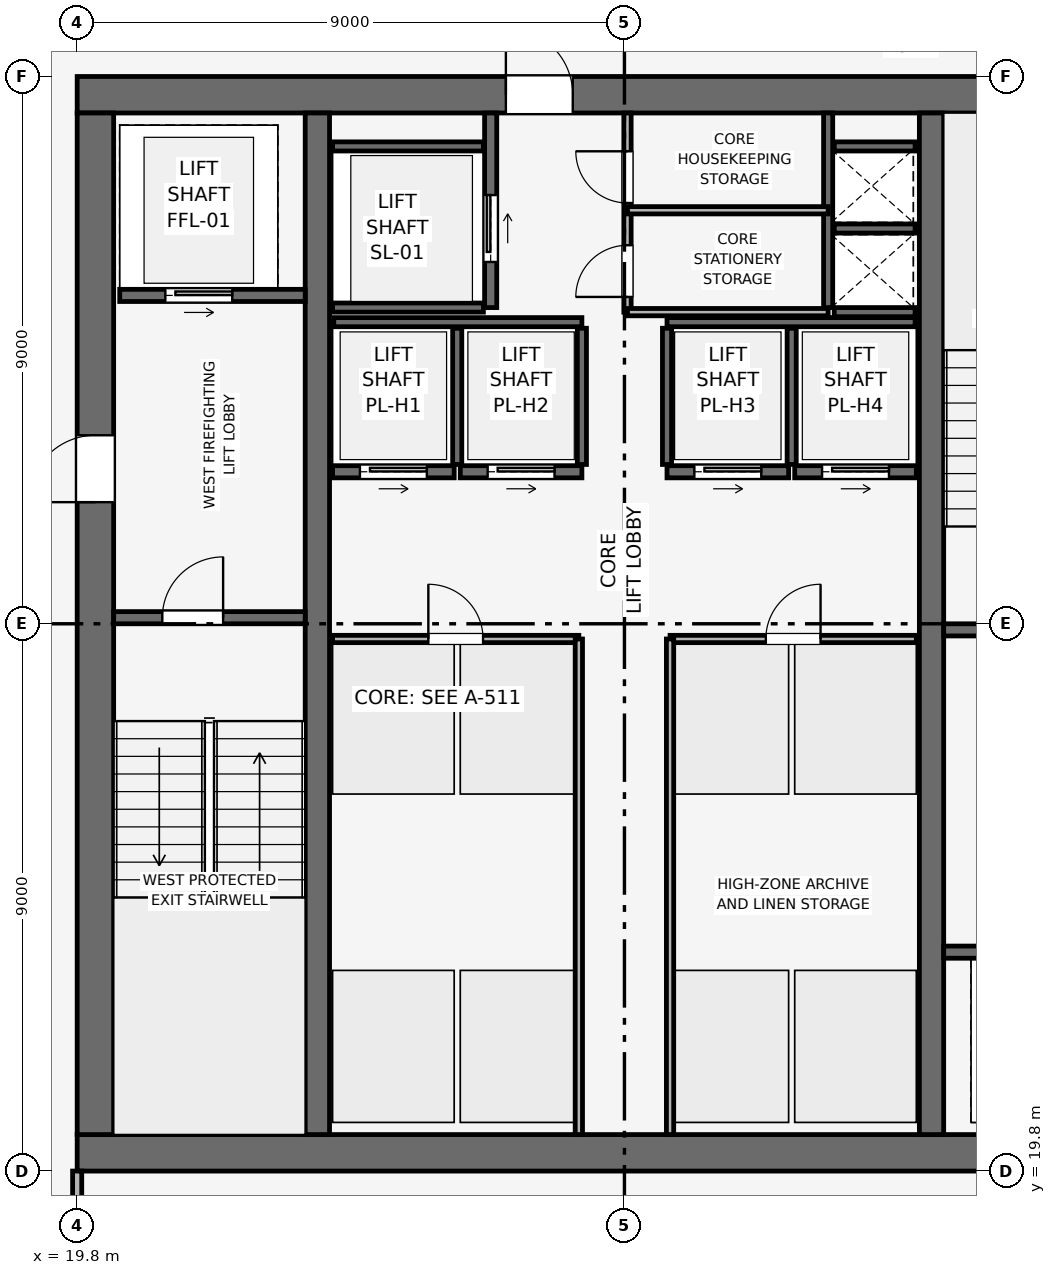
"""IFC4 building model, lengths in metres.
Left out: names, types, materials, properties, quantities, classifications, styles, units other than length and angle.
Written with IfcOpenShell. Run it as: python <this file> out.ifc"""

import sys

from ifc_helpers import new_model, si_unit, direction, frame, frame_2d, origin, place, context, subcontext, project, spatial, rectangle, extrude, element, fill, save


model = new_model("IFC4")
c1 = context("Model", 3, precision=1e-05, world=origin(), true_north=direction((0.0, 1.0)))
c2 = subcontext(c1, "Body", "Model", "MODEL_VIEW")
j1 = project(units=[si_unit("LENGTHUNIT", "METRE"), si_unit("PLANEANGLEUNIT", "RADIAN")], contexts=[c1])
p1 = place(None, origin())
s1 = spatial("IfcSite", under=j1, at=p1, CompositionType="ELEMENT")
p2 = place(p1, origin())
s2 = spatial("IfcBuilding", under=s1, at=p2, CompositionType="ELEMENT")
p3 = place(p2, frame((0.0, 0.0, 351.75)))
s3 = spatial("IfcBuildingStorey", under=s2, at=p3, CompositionType="ELEMENT", Elevation=351.75)
p4 = place(p3, frame((19.8, 20.1, 0.0), z_axis=(0.0, 0.0, 1.0), x_axis=(1.0, 0.0, 0.0)))
e1 = element("IfcWall", 1, at=p4, inside=s3, PredefinedType="SHEAR", context=c2, shape_type="SweptSolid", body=[
    extrude(rectangle(XDim=18.0, YDim=0.6, at=frame_2d((9.0, 0.0))), origin(), (0.0, 0.0, 1.0), 3.75),
])
p5 = place(p3, frame((19.8, 37.5, 0.0), z_axis=(0.0, 0.0, 1.0), x_axis=(1.0, 0.0, 0.0)))
e2 = element("IfcWall", 2, at=p5, inside=s3, PredefinedType="SHEAR", context=c2, shape_type="SweptSolid", body=[
    extrude(rectangle(XDim=18.0, YDim=0.6, at=frame_2d((9.0, 0.0))), origin(), (0.0, 0.0, 1.0), 3.75),
])
p6 = place(p5, frame((7.05, 0.0, 0.0)))
e3 = element("IfcOpeningElement", 3, at=p6, cuts=e2, PredefinedType="OPENING", context=c2, shape_type="SweptSolid", body=[
    extrude(rectangle(XDim=1.1, YDim=2.15, at=frame_2d((0.55, 1.075))), frame((0.0, 0.31, 0.0), z_axis=(0.0, -1.0, 0.0), x_axis=(1.0, 0.0, 0.0)), (0.0, 0.0, 1.0), 0.62),
])
p7 = place(p3, frame((20.1, 20.4, 0.0), z_axis=(0.0, 0.0, 1.0), x_axis=(0.0, 1.0, 0.0)))
e4 = element("IfcWall", 4, at=p7, inside=s3, PredefinedType="SHEAR", context=c2, shape_type="SweptSolid", body=[
    extrude(rectangle(XDim=16.8, YDim=0.6, at=frame_2d((8.4, 0.0))), origin(), (0.0, 0.0, 1.0), 3.75),
])
p8 = place(p7, frame((10.4, 0.0, 0.0)))
e5 = element("IfcOpeningElement", 5, at=p8, cuts=e4, PredefinedType="OPENING", context=c2, shape_type="SweptSolid", body=[
    extrude(rectangle(XDim=1.1, YDim=2.15, at=frame_2d((0.55, 1.075))), frame((0.0, 0.31, 0.0), z_axis=(0.0, -1.0, 0.0), x_axis=(1.0, 0.0, 0.0)), (0.0, 0.0, 1.0), 0.62),
])
for number, where, z_axis, x_axis in (
    (6, (23.75, 20.4, 0.0), (0.0, 0.0, 1.0), (0.0, 1.0, 0.0)),
    (7, (33.85, 20.4, 0.0), (0.0, 0.0, 1.0), (0.0, 1.0, 0.0)),
):
    element("IfcWall", number, at=place(p3, frame(where, z_axis=z_axis, x_axis=x_axis)), inside=s3, PredefinedType="SHEAR", context=c2, shape_type="SweptSolid", body=[
        extrude(rectangle(XDim=16.8, YDim=0.4, at=frame_2d((8.4, 0.0))), origin(), (0.0, 0.0, 1.0), 3.75),
    ])
p9 = place(p3, frame((20.4, 28.9, 0.0), z_axis=(0.0, 0.0, 1.0), x_axis=(1.0, 0.0, 0.0)))
e8 = element("IfcWall", 8, at=p9, inside=s3, PredefinedType="SHEAR", context=c2, shape_type="SweptSolid", body=[
    extrude(rectangle(XDim=3.15, YDim=0.2, at=frame_2d((1.575, 0.0))), origin(), (0.0, 0.0, 1.0), 3.49),
])
p10 = place(p9, frame((0.8, 0.0, 0.0)))
e9 = element("IfcOpeningElement", 9, at=p10, cuts=e8, PredefinedType="OPENING", context=c2, shape_type="SweptSolid", body=[
    extrude(rectangle(XDim=1.0, YDim=2.1, at=frame_2d((0.5, 1.05))), frame((0.0, 0.11, 0.0), z_axis=(0.0, -1.0, 0.0), x_axis=(1.0, 0.0, 0.0)), (0.0, 0.0, 1.0), 0.22),
])
p11 = place(p3, frame((34.05, 28.7, 0.0), z_axis=(0.0, 0.0, 1.0), x_axis=(1.0, 0.0, 0.0)))
e10 = element("IfcWall", 10, at=p11, inside=s3, PredefinedType="SHEAR", context=c2, shape_type="SweptSolid", body=[
    extrude(rectangle(XDim=3.15, YDim=0.2, at=frame_2d((1.575, 0.0))), origin(), (0.0, 0.0, 1.0), 3.49),
])
p12 = place(p11, frame((0.8, 0.0, 0.0)))
e11 = element("IfcOpeningElement", 11, at=p12, cuts=e10, PredefinedType="OPENING", context=c2, shape_type="SweptSolid", body=[
    extrude(rectangle(XDim=1.0, YDim=2.1, at=frame_2d((0.5, 1.05))), frame((0.0, 0.11, 0.0), z_axis=(0.0, -1.0, 0.0), x_axis=(1.0, 0.0, 0.0)), (0.0, 0.0, 1.0), 0.22),
])
p13 = place(p3, frame((32.15, 34.0, 0.0), z_axis=(0.0, 0.0, 1.0), x_axis=(0.0, 1.0, 0.0)))
e12 = element("IfcWall", 12, at=p13, inside=s3, PredefinedType="SHEAR", context=c2, shape_type="SweptSolid", body=[
    extrude(rectangle(XDim=3.2, YDim=0.15, at=frame_2d((1.6, 0.0))), origin(), (0.0, 0.0, 1.0), 3.49),
])
for number, where, z_axis, x_axis in (
    (13, (32.25, 33.925, 0.0), (0.0, 0.0, 1.0), (1.0, 0.0, 0.0)),
    (14, (32.25, 35.3, 0.0), (0.0, 0.0, 1.0), (1.0, 0.0, 0.0)),
):
    element("IfcWall", number, at=place(p3, frame(where, z_axis=z_axis, x_axis=x_axis)), inside=s3, PredefinedType="SHEAR", context=c2, shape_type="SweptSolid", body=[
        extrude(rectangle(XDim=1.33, YDim=0.15, at=frame_2d((0.665, 0.0))), origin(), (0.0, 0.0, 1.0), 3.49),
    ])
p14 = place(p3, frame((20.5, 34.2, 0.0), z_axis=(0.0, 0.0, 1.0), x_axis=(1.0, 0.0, 0.0)))
e15 = element("IfcWall", 15, at=p14, inside=s3, PredefinedType="SHEAR", context=c2, shape_type="SweptSolid", body=[
    extrude(rectangle(XDim=3.05, YDim=0.2, at=frame_2d((1.525, 0.0))), origin(), (0.0, 0.0, 1.0), 3.49),
])
p15 = place(p14, frame((0.75, 0.0, 0.0)))
e16 = element("IfcOpeningElement", 16, at=p15, cuts=e15, PredefinedType="OPENING", context=c2, shape_type="SweptSolid", body=[
    extrude(rectangle(XDim=1.1, YDim=2.15, at=frame_2d((0.55, 1.075))), frame((0.0, 0.11, 0.0), z_axis=(0.0, -1.0, 0.0), x_axis=(1.0, 0.0, 0.0)), (0.0, 0.0, 1.0), 0.22),
])
p16 = place(p3, frame((34.05, 23.4, 0.0), z_axis=(0.0, 0.0, 1.0), x_axis=(1.0, 0.0, 0.0)))
e17 = element("IfcWall", 17, at=p16, inside=s3, PredefinedType="SHEAR", context=c2, shape_type="SweptSolid", body=[
    extrude(rectangle(XDim=3.05, YDim=0.2, at=frame_2d((1.525, 0.0))), origin(), (0.0, 0.0, 1.0), 3.49),
])
p17 = place(p16, frame((1.2, 0.0, 0.0)))
e18 = element("IfcOpeningElement", 18, at=p17, cuts=e17, PredefinedType="OPENING", context=c2, shape_type="SweptSolid", body=[
    extrude(rectangle(XDim=1.1, YDim=2.15, at=frame_2d((0.55, 1.075))), frame((0.0, 0.11, 0.0), z_axis=(0.0, -1.0, 0.0), x_axis=(1.0, 0.0, 0.0)), (0.0, 0.0, 1.0), 0.22),
])
p18 = place(p3, frame((26.6, 34.0, 0.0), z_axis=(0.0, 0.0, 1.0), x_axis=(0.0, 1.0, 0.0)))
e19 = element("IfcWall", 19, at=p18, inside=s3, PredefinedType="SHEAR", context=c2, shape_type="SweptSolid", body=[
    extrude(rectangle(XDim=3.2, YDim=0.2, at=frame_2d((1.6, 0.0))), origin(), (0.0, 0.0, 1.0), 3.49),
])
p19 = place(p18, frame((0.75, 0.0, 0.0)))
e20 = element("IfcOpeningElement", 20, at=p19, cuts=e19, PredefinedType="OPENING", context=c2, shape_type="SweptSolid", body=[
    extrude(rectangle(XDim=1.1, YDim=2.15, at=frame_2d((0.55, 1.075))), frame((0.0, 0.11, 0.0), z_axis=(0.0, -1.0, 0.0), x_axis=(1.0, 0.0, 0.0)), (0.0, 0.0, 1.0), 0.22),
])
for number, where, z_axis, x_axis in (
    (21, (24.0, 34.0, 0.0), (0.0, 0.0, 1.0), (1.0, 0.0, 0.0)),
    (22, (24.0, 36.65, 0.0), (0.0, 0.0, 1.0), (1.0, 0.0, 0.0)),
):
    element("IfcWall", number, at=place(p3, frame(where, z_axis=z_axis, x_axis=x_axis)), inside=s3, PredefinedType="SHEAR", context=c2, shape_type="SweptSolid", body=[
        extrude(rectangle(XDim=2.48, YDim=0.15, at=frame_2d((1.24, 0.0))), origin(), (0.0, 0.0, 1.0), 3.49),
    ])
p20 = place(p3, frame((24.0, 31.3, 0.0), z_axis=(0.0, 0.0, 1.0), x_axis=(1.0, 0.0, 0.0)))
e23 = element("IfcWall", 23, at=p20, inside=s3, PredefinedType="SHEAR", context=c2, shape_type="SweptSolid", body=[
    extrude(rectangle(XDim=2.0, YDim=0.2, at=frame_2d((1.0, 0.0))), origin(), (0.0, 0.0, 1.0), 3.49),
])
p21 = place(p20, frame((0.45, 0.0, 0.0)))
e24 = element("IfcOpeningElement", 24, at=p21, cuts=e23, PredefinedType="OPENING", context=c2, shape_type="SweptSolid", body=[
    extrude(rectangle(XDim=1.1, YDim=2.15, at=frame_2d((0.55, 1.075))), frame((0.0, 0.11, 0.0), z_axis=(0.0, -1.0, 0.0), x_axis=(1.0, 0.0, 0.0)), (0.0, 0.0, 1.0), 0.22),
])
p22 = place(p3, frame((26.1, 31.3, 0.0), z_axis=(0.0, 0.0, 1.0), x_axis=(1.0, 0.0, 0.0)))
e25 = element("IfcWall", 25, at=p22, inside=s3, PredefinedType="SHEAR", context=c2, shape_type="SweptSolid", body=[
    extrude(rectangle(XDim=2.0, YDim=0.2, at=frame_2d((1.0, 0.0))), origin(), (0.0, 0.0, 1.0), 3.49),
])
p23 = place(p22, frame((0.45, 0.0, 0.0)))
e26 = element("IfcOpeningElement", 26, at=p23, cuts=e25, PredefinedType="OPENING", context=c2, shape_type="SweptSolid", body=[
    extrude(rectangle(XDim=1.1, YDim=2.15, at=frame_2d((0.55, 1.075))), frame((0.0, 0.11, 0.0), z_axis=(0.0, -1.0, 0.0), x_axis=(1.0, 0.0, 0.0)), (0.0, 0.0, 1.0), 0.22),
])
p24 = place(p3, frame((29.5, 31.3, 0.0), z_axis=(0.0, 0.0, 1.0), x_axis=(1.0, 0.0, 0.0)))
e27 = element("IfcWall", 27, at=p24, inside=s3, PredefinedType="SHEAR", context=c2, shape_type="SweptSolid", body=[
    extrude(rectangle(XDim=2.0, YDim=0.2, at=frame_2d((1.0, 0.0))), origin(), (0.0, 0.0, 1.0), 3.49),
])
p25 = place(p24, frame((0.45, 0.0, 0.0)))
e28 = element("IfcOpeningElement", 28, at=p25, cuts=e27, PredefinedType="OPENING", context=c2, shape_type="SweptSolid", body=[
    extrude(rectangle(XDim=1.1, YDim=2.15, at=frame_2d((0.55, 1.075))), frame((0.0, 0.11, 0.0), z_axis=(0.0, -1.0, 0.0), x_axis=(1.0, 0.0, 0.0)), (0.0, 0.0, 1.0), 0.22),
])
p26 = place(p3, frame((31.6, 31.3, 0.0), z_axis=(0.0, 0.0, 1.0), x_axis=(1.0, 0.0, 0.0)))
e29 = element("IfcWall", 29, at=p26, inside=s3, PredefinedType="SHEAR", context=c2, shape_type="SweptSolid", body=[
    extrude(rectangle(XDim=2.0, YDim=0.2, at=frame_2d((1.0, 0.0))), origin(), (0.0, 0.0, 1.0), 3.49),
])
p27 = place(p26, frame((0.45, 0.0, 0.0)))
e30 = element("IfcOpeningElement", 30, at=p27, cuts=e29, PredefinedType="OPENING", context=c2, shape_type="SweptSolid", body=[
    extrude(rectangle(XDim=1.1, YDim=2.15, at=frame_2d((0.55, 1.075))), frame((0.0, 0.11, 0.0), z_axis=(0.0, -1.0, 0.0), x_axis=(1.0, 0.0, 0.0)), (0.0, 0.0, 1.0), 0.22),
])
p28 = place(p3, frame((32.25, 36.65, 0.0), z_axis=(0.0, 0.0, 1.0), x_axis=(1.0, 0.0, 0.0)))
e31 = element("IfcWall", 31, at=p28, inside=s3, PredefinedType="SHEAR", context=c2, shape_type="SweptSolid", body=[
    extrude(rectangle(XDim=1.33, YDim=0.15, at=frame_2d((0.665, 0.0))), origin(), (0.0, 0.0, 1.0), 3.49),
])
for number, where, z_axis, x_axis in (
    (32, (24.02, 33.76, 0.0), (0.0, 0.0, 1.0), (1.0, 0.0, 0.0)),
    (33, (29.5, 33.76, 0.0), (0.0, 0.0, 1.0), (1.0, 0.0, 0.0)),
):
    element("IfcWall", number, at=place(p3, frame(where, z_axis=z_axis, x_axis=x_axis)), inside=s3, PredefinedType="SHEAR", context=c2, shape_type="SweptSolid", body=[
        extrude(rectangle(XDim=4.08, YDim=0.15, at=frame_2d((2.04, 0.0))), origin(), (0.0, 0.0, 1.0), 3.49),
    ])
for number, where, z_axis, x_axis in (
    (34, (26.05, 31.42, 0.0), (0.0, 0.0, 1.0), (0.0, 1.0, 0.0)),
    (35, (28.1, 31.42, 0.0), (0.0, 0.0, 1.0), (0.0, 1.0, 0.0)),
    (36, (29.5, 31.42, 0.0), (0.0, 0.0, 1.0), (0.0, 1.0, 0.0)),
    (37, (31.55, 31.42, 0.0), (0.0, 0.0, 1.0), (0.0, 1.0, 0.0)),
):
    element("IfcWall", number, at=place(p3, frame(where, z_axis=z_axis, x_axis=x_axis)), inside=s3, PredefinedType="SHEAR", context=c2, shape_type="SweptSolid", body=[
        extrude(rectangle(XDim=2.24, YDim=0.15, at=frame_2d((1.12, 0.0))), origin(), (0.0, 0.0, 1.0), 3.49),
    ])
p29 = place(p3, frame((28.85, 33.925, 0.0), z_axis=(0.0, 0.0, 1.0), x_axis=(0.0, 1.0, 0.0)))
e38 = element("IfcWall", 38, at=p29, inside=s3, PredefinedType="PARTITIONING", context=c2, shape_type="SweptSolid", body=[
    extrude(rectangle(XDim=3.275, YDim=0.12, at=frame_2d((1.637, 0.0))), origin(), (0.0, 0.0, 1.0), 3.49),
])
p30 = place(p29, frame((0.25, 0.0, 0.0)))
e39 = element("IfcOpeningElement", 39, at=p30, cuts=e38, PredefinedType="OPENING", context=c2, shape_type="SweptSolid", body=[
    extrude(rectangle(XDim=0.85, YDim=2.1, at=frame_2d((0.425, 1.05))), frame((0.0, 0.07, 0.0), z_axis=(0.0, -1.0, 0.0), x_axis=(1.0, 0.0, 0.0)), (0.0, 0.0, 1.0), 0.14),
])
p31 = place(p29, frame((1.795, 0.0, 0.0)))
e40 = element("IfcOpeningElement", 40, at=p31, cuts=e38, PredefinedType="OPENING", context=c2, shape_type="SweptSolid", body=[
    extrude(rectangle(XDim=0.85, YDim=2.1, at=frame_2d((0.425, 1.05))), frame((0.0, 0.07, 0.0), z_axis=(0.0, -1.0, 0.0), x_axis=(1.0, 0.0, 0.0)), (0.0, 0.0, 1.0), 0.14),
])
for number, where, z_axis, x_axis in (
    (41, (28.85, 35.6, 0.0), (0.0, 0.0, 1.0), (1.0, 0.0, 0.0)),
    (42, (28.85, 33.925, 0.0), (0.0, 0.0, 1.0), (1.0, 0.0, 0.0)),
):
    element("IfcWall", number, at=place(p3, frame(where, z_axis=z_axis, x_axis=x_axis)), inside=s3, PredefinedType="PARTITIONING", context=c2, shape_type="SweptSolid", body=[
        extrude(rectangle(XDim=3.3, YDim=0.12, at=frame_2d((1.65, 0.0))), origin(), (0.0, 0.0, 1.0), 3.49),
    ])
p32 = place(p3, frame((24.0, 28.55, 0.0), z_axis=(0.0, 0.0, 1.0), x_axis=(1.0, 0.0, 0.0)))
e43 = element("IfcWall", 43, at=p32, inside=s3, PredefinedType="PARTITIONING", context=c2, shape_type="SweptSolid", body=[
    extrude(rectangle(XDim=4.05, YDim=0.12, at=frame_2d((2.025, 0.0))), origin(), (0.0, 0.0, 1.0), 3.49),
])
p33 = place(p32, frame((1.575, 0.0, 0.0)))
e44 = element("IfcOpeningElement", 44, at=p33, cuts=e43, PredefinedType="OPENING", context=c2, shape_type="SweptSolid", body=[
    extrude(rectangle(XDim=0.9, YDim=2.1, at=frame_2d((0.45, 1.05))), frame((0.0, 0.07, 0.0), z_axis=(0.0, -1.0, 0.0), x_axis=(1.0, 0.0, 0.0)), (0.0, 0.0, 1.0), 0.14),
])
p34 = place(p3, frame((28.05, 20.4, 0.0), z_axis=(0.0, 0.0, 1.0), x_axis=(0.0, 1.0, 0.0)))
e45 = element("IfcWall", 45, at=p34, inside=s3, PredefinedType="PARTITIONING", context=c2, shape_type="SweptSolid", body=[
    extrude(rectangle(XDim=8.15, YDim=0.12, at=frame_2d((4.075, 0.0))), origin(), (0.0, 0.0, 1.0), 3.49),
])
p35 = place(p3, frame((29.55, 28.55, 0.0), z_axis=(0.0, 0.0, 1.0), x_axis=(1.0, 0.0, 0.0)))
e46 = element("IfcWall", 46, at=p35, inside=s3, PredefinedType="PARTITIONING", context=c2, shape_type="SweptSolid", body=[
    extrude(rectangle(XDim=4.05, YDim=0.12, at=frame_2d((2.025, 0.0))), origin(), (0.0, 0.0, 1.0), 3.49),
])
p36 = place(p35, frame((1.575, 0.0, 0.0)))
e47 = element("IfcOpeningElement", 47, at=p36, cuts=e46, PredefinedType="OPENING", context=c2, shape_type="SweptSolid", body=[
    extrude(rectangle(XDim=0.9, YDim=2.1, at=frame_2d((0.45, 1.05))), frame((0.0, 0.07, 0.0), z_axis=(0.0, -1.0, 0.0), x_axis=(1.0, 0.0, 0.0)), (0.0, 0.0, 1.0), 0.14),
])
p37 = place(p3, frame((29.55, 20.4, 0.0), z_axis=(0.0, 0.0, 1.0), x_axis=(0.0, 1.0, 0.0)))
e48 = element("IfcWall", 48, at=p37, inside=s3, PredefinedType="PARTITIONING", context=c2, shape_type="SweptSolid", body=[
    extrude(rectangle(XDim=8.15, YDim=0.12, at=frame_2d((4.075, 0.0))), origin(), (0.0, 0.0, 1.0), 3.49),
])
p38 = place(p3, frame((19.8, 7.63, 0.0), z_axis=(0.0, 0.0, 1.0), x_axis=(0.0, 1.0, 0.0)))
e49 = element("IfcWall", 49, at=p38, inside=s3, PredefinedType="PARTITIONING", context=c2, shape_type="SweptSolid", body=[
    extrude(rectangle(XDim=12.17, YDim=0.15, at=frame_2d((6.085, 0.0))), origin(), (0.0, 0.0, 1.0), 3.075),
])
p39 = place(p38, frame((8.47, 0.0, 0.0)))
e50 = element("IfcOpeningElement", 50, at=p39, cuts=e49, PredefinedType="OPENING", context=c2, shape_type="SweptSolid", body=[
    extrude(rectangle(XDim=0.9, YDim=2.1, at=frame_2d((0.45, 1.05))), frame((0.0, 0.085, 0.0), z_axis=(0.0, -1.0, 0.0), x_axis=(1.0, 0.0, 0.0)), (0.0, 0.0, 1.0), 0.17),
])
p40 = place(p10, origin())
e51 = element("IfcDoor", 51, at=p40, inside=s3, OperationType="SINGLE_SWING_RIGHT", PredefinedType="DOOR", context=c2, shape_type="SweptSolid", body=[
    extrude(rectangle(XDim=1.0, YDim=2.1, at=frame_2d((0.5, 1.05))), frame((0.0, 0.025, 0.0), z_axis=(0.0, -1.0, 0.0), x_axis=(1.0, 0.0, 0.0)), (0.0, 0.0, 1.0), 0.05),
])
fill(e9, e51)
p41 = place(p15, origin())
e52 = element("IfcDoor", 52, at=p41, inside=s3, OperationType="SLIDING_TO_RIGHT", PredefinedType="DOOR", context=c2, shape_type="SweptSolid", body=[
    extrude(rectangle(XDim=1.1, YDim=2.15, at=frame_2d((0.55, 1.075))), frame((0.0, 0.025, 0.0), z_axis=(0.0, -1.0, 0.0), x_axis=(1.0, 0.0, 0.0)), (0.0, 0.0, 1.0), 0.05),
])
fill(e16, e52)
p42 = place(p19, origin())
e53 = element("IfcDoor", 53, at=p42, inside=s3, OperationType="SLIDING_TO_RIGHT", PredefinedType="DOOR", context=c2, shape_type="SweptSolid", body=[
    extrude(rectangle(XDim=1.1, YDim=2.15, at=frame_2d((0.55, 1.075))), frame((0.0, 0.025, 0.0), z_axis=(0.0, -1.0, 0.0), x_axis=(1.0, 0.0, 0.0)), (0.0, 0.0, 1.0), 0.05),
])
fill(e20, e53)
p43 = place(p21, origin())
e54 = element("IfcDoor", 54, at=p43, inside=s3, OperationType="SLIDING_TO_RIGHT", PredefinedType="DOOR", context=c2, shape_type="SweptSolid", body=[
    extrude(rectangle(XDim=1.1, YDim=2.15, at=frame_2d((0.55, 1.075))), frame((0.0, 0.025, 0.0), z_axis=(0.0, -1.0, 0.0), x_axis=(1.0, 0.0, 0.0)), (0.0, 0.0, 1.0), 0.05),
])
fill(e24, e54)
p44 = place(p23, origin())
e55 = element("IfcDoor", 55, at=p44, inside=s3, OperationType="SLIDING_TO_RIGHT", PredefinedType="DOOR", context=c2, shape_type="SweptSolid", body=[
    extrude(rectangle(XDim=1.1, YDim=2.15, at=frame_2d((0.55, 1.075))), frame((0.0, 0.025, 0.0), z_axis=(0.0, -1.0, 0.0), x_axis=(1.0, 0.0, 0.0)), (0.0, 0.0, 1.0), 0.05),
])
fill(e26, e55)
p45 = place(p25, origin())
e56 = element("IfcDoor", 56, at=p45, inside=s3, OperationType="SLIDING_TO_RIGHT", PredefinedType="DOOR", context=c2, shape_type="SweptSolid", body=[
    extrude(rectangle(XDim=1.1, YDim=2.15, at=frame_2d((0.55, 1.075))), frame((0.0, 0.025, 0.0), z_axis=(0.0, -1.0, 0.0), x_axis=(1.0, 0.0, 0.0)), (0.0, 0.0, 1.0), 0.05),
])
fill(e28, e56)
p46 = place(p27, origin())
e57 = element("IfcDoor", 57, at=p46, inside=s3, OperationType="SLIDING_TO_RIGHT", PredefinedType="DOOR", context=c2, shape_type="SweptSolid", body=[
    extrude(rectangle(XDim=1.1, YDim=2.15, at=frame_2d((0.55, 1.075))), frame((0.0, 0.025, 0.0), z_axis=(0.0, -1.0, 0.0), x_axis=(1.0, 0.0, 0.0)), (0.0, 0.0, 1.0), 0.05),
])
fill(e30, e57)
p47 = place(p30, origin())
e58 = element("IfcDoor", 58, at=p47, inside=s3, OperationType="SINGLE_SWING_LEFT", PredefinedType="DOOR", context=c2, shape_type="SweptSolid", body=[
    extrude(rectangle(XDim=0.85, YDim=2.1, at=frame_2d((0.425, 1.05))), frame((0.0, 0.025, 0.0), z_axis=(0.0, -1.0, 0.0), x_axis=(1.0, 0.0, 0.0)), (0.0, 0.0, 1.0), 0.05),
])
fill(e39, e58)
p48 = place(p31, origin())
e59 = element("IfcDoor", 59, at=p48, inside=s3, OperationType="SINGLE_SWING_RIGHT", PredefinedType="DOOR", context=c2, shape_type="SweptSolid", body=[
    extrude(rectangle(XDim=0.85, YDim=2.1, at=frame_2d((0.425, 1.05))), frame((0.0, 0.025, 0.0), z_axis=(0.0, -1.0, 0.0), x_axis=(1.0, 0.0, 0.0)), (0.0, 0.0, 1.0), 0.05),
])
fill(e40, e59)
p49 = place(p33, origin())
e60 = element("IfcDoor", 60, at=p49, inside=s3, OperationType="SINGLE_SWING_LEFT", PredefinedType="DOOR", context=c2, shape_type="SweptSolid", body=[
    extrude(rectangle(XDim=0.9, YDim=2.1, at=frame_2d((0.45, 1.05))), frame((0.0, 0.025, 0.0), z_axis=(0.0, -1.0, 0.0), x_axis=(1.0, 0.0, 0.0)), (0.0, 0.0, 1.0), 0.05),
])
fill(e44, e60)
p50 = place(p36, origin())
e61 = element("IfcDoor", 61, at=p50, inside=s3, OperationType="SINGLE_SWING_RIGHT", PredefinedType="DOOR", context=c2, shape_type="SweptSolid", body=[
    extrude(rectangle(XDim=0.9, YDim=2.1, at=frame_2d((0.45, 1.05))), frame((0.0, 0.025, 0.0), z_axis=(0.0, -1.0, 0.0), x_axis=(1.0, 0.0, 0.0)), (0.0, 0.0, 1.0), 0.05),
])
fill(e47, e61)
p51 = place(p8, origin())
e62 = element("IfcDoor", 62, at=p51, inside=s3, OperationType="SINGLE_SWING_LEFT", PredefinedType="DOOR", context=c2, shape_type="SweptSolid", body=[
    extrude(rectangle(XDim=1.1, YDim=2.15, at=frame_2d((0.55, 1.075))), frame((0.0, 0.025, 0.0), z_axis=(0.0, -1.0, 0.0), x_axis=(1.0, 0.0, 0.0)), (0.0, 0.0, 1.0), 0.05),
])
fill(e5, e62)
p52 = place(p6, origin())
e63 = element("IfcDoor", 63, at=p52, inside=s3, OperationType="SINGLE_SWING_LEFT", PredefinedType="DOOR", context=c2, shape_type="SweptSolid", body=[
    extrude(rectangle(XDim=1.1, YDim=2.15, at=frame_2d((0.55, 1.075))), frame((0.0, 0.025, 0.0), z_axis=(0.0, -1.0, 0.0), x_axis=(1.0, 0.0, 0.0)), (0.0, 0.0, 1.0), 0.05),
])
fill(e3, e63)
save(model, sys.argv[1])
